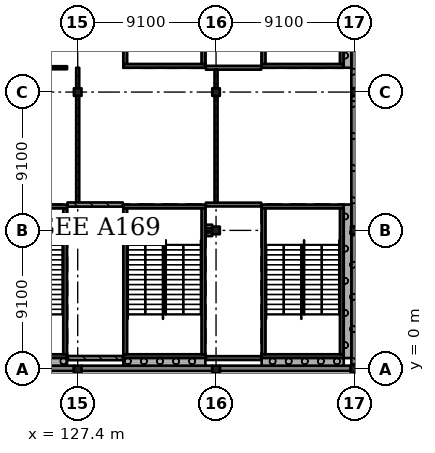
"""IFC4 building model, lengths in metres.
Left out: names, types, materials, properties, quantities, classifications, styles, units other than length and angle.
Written with IfcOpenShell. Run it as: python <this file> out.ifc"""

import sys

from ifc_helpers import new_model, si_unit, direction, frame, frame_2d, origin, origin_2d, place, context, subcontext, project, spatial, rectangle, extrude, element, fill, save


model = new_model("IFC4")
c1 = context("Model", 3, precision=1e-05, world=origin(), true_north=direction((0.0, 1.0)))
c2 = subcontext(c1, "Body", "Model", "MODEL_VIEW")
j1 = project(units=[si_unit("LENGTHUNIT", "METRE"), si_unit("PLANEANGLEUNIT", "RADIAN")], contexts=[c1])
p1 = place(None, origin())
s1 = spatial("IfcSite", under=j1, at=p1, CompositionType="ELEMENT")
p2 = place(p1, origin())
s2 = spatial("IfcBuilding", under=s1, at=p2, CompositionType="ELEMENT")
p3 = place(p2, frame((0.0, 0.0, 24.57)))
s3 = spatial("IfcBuildingStorey", under=s2, at=p3, CompositionType="ELEMENT", Elevation=24.57)
for number, where, z_axis, x_axis in (
    (1, (127.4, -0.05, 0.0), (0.0, 0.0, 1.0), (1.0, 0.0, 0.0)),
    (2, (127.4, 9.1, 0.0), (0.0, 0.0, 1.0), (1.0, 0.0, 0.0)),
    (3, (127.4, 18.2, 0.0), (0.0, 0.0, 1.0), (1.0, 0.0, 0.0)),
    (4, (136.5, -0.05, 0.0), (0.0, 0.0, 1.0), (1.0, 0.0, 0.0)),
    (5, (136.5, 9.1, 0.0), (0.0, 0.0, 1.0), (1.0, 0.0, 0.0)),
    (6, (136.5, 18.2, 0.0), (0.0, 0.0, 1.0), (1.0, 0.0, 0.0)),
    (7, (145.6, 0.0, 0.0), (0.0, 0.0, 1.0), (1.0, 0.0, 0.0)),
    (8, (145.625, 9.1, 0.0), (0.0, 0.0, 1.0), (1.0, 0.0, 0.0)),
    (9, (145.65, 18.2, 0.0), (0.0, 0.0, 1.0), (1.0, 0.0, 0.0)),
):
    element("IfcColumn", number, at=place(p3, frame(where, z_axis=z_axis, x_axis=x_axis)), inside=s3, PredefinedType="COLUMN", context=c2, shape_type="SweptSolid", body=[
        extrude(rectangle(XDim=0.5, YDim=0.5, at=origin_2d()), origin(), (0.0, 0.0, 1.0), 4.55),
    ])
p4 = place(p3, frame((144.9, 0.825, 0.0), z_axis=(0.0, 0.0, 1.0), x_axis=(-1.0, 0.0, 0.0)))
e10 = element("IfcWall", 10, at=p4, inside=s3, PredefinedType="SHEAR", context=c2, shape_type="SweptSolid", body=[
    extrude(rectangle(XDim=5.4, YDim=0.25, at=frame_2d((2.7, 0.0))), origin(), (0.0, 0.0, 1.0), 4.55),
])
p5 = place(p3, frame((144.9, 10.675, 0.0), z_axis=(0.0, 0.0, 1.0), x_axis=(-1.0, 0.0, 0.0)))
e11 = element("IfcWall", 11, at=p5, inside=s3, PredefinedType="SHEAR", context=c2, shape_type="SweptSolid", body=[
    extrude(rectangle(XDim=5.4, YDim=0.25, at=frame_2d((2.7, 0.0))), origin(), (0.0, 0.0, 1.0), 4.55),
])
p6 = place(p5, frame((1.5, 0.0, 0.0)))
e12 = element("IfcOpeningElement", 12, at=p6, cuts=e11, PredefinedType="OPENING", context=c2, shape_type="SweptSolid", body=[
    extrude(rectangle(XDim=2.4, YDim=2.1, at=frame_2d((1.2, 1.05))), frame((0.0, 0.135, 0.0), z_axis=(0.0, -1.0, 0.0), x_axis=(1.0, 0.0, 0.0)), (0.0, 0.0, 1.0), 0.27),
])
for number, where, z_axis, x_axis in (
    (13, (139.625, 10.55, 0.0), (0.0, 0.0, 1.0), (0.0, -1.0, 0.0)),
    (14, (144.775, 10.55, 0.0), (0.0, 0.0, 1.0), (0.0, -1.0, 0.0)),
):
    element("IfcWall", number, at=place(p3, frame(where, z_axis=z_axis, x_axis=x_axis)), inside=s3, PredefinedType="SHEAR", context=c2, shape_type="SweptSolid", body=[
        extrude(rectangle(XDim=9.6, YDim=0.25, at=frame_2d((4.8, 0.0))), origin(), (0.0, 0.0, 1.0), 4.55),
    ])
p7 = place(p3, frame((135.8, 0.825, 0.0), z_axis=(0.0, 0.0, 1.0), x_axis=(-1.0, 0.0, 0.0)))
e15 = element("IfcWall", 15, at=p7, inside=s3, PredefinedType="SHEAR", context=c2, shape_type="SweptSolid", body=[
    extrude(rectangle(XDim=5.4, YDim=0.25, at=frame_2d((2.7, 0.0))), origin(), (0.0, 0.0, 1.0), 4.55),
])
p8 = place(p3, frame((135.8, 10.675, 0.0), z_axis=(0.0, 0.0, 1.0), x_axis=(-1.0, 0.0, 0.0)))
e16 = element("IfcWall", 16, at=p8, inside=s3, PredefinedType="SHEAR", context=c2, shape_type="SweptSolid", body=[
    extrude(rectangle(XDim=5.4, YDim=0.25, at=frame_2d((2.7, 0.0))), origin(), (0.0, 0.0, 1.0), 4.55),
])
p9 = place(p8, frame((1.5, 0.0, 0.0)))
e17 = element("IfcOpeningElement", 17, at=p9, cuts=e16, PredefinedType="OPENING", context=c2, shape_type="SweptSolid", body=[
    extrude(rectangle(XDim=2.4, YDim=2.1, at=frame_2d((1.2, 1.05))), frame((0.0, 0.135, 0.0), z_axis=(0.0, -1.0, 0.0), x_axis=(1.0, 0.0, 0.0)), (0.0, 0.0, 1.0), 0.27),
])
for number, where, z_axis, x_axis in (
    (18, (130.525, 10.55, 0.0), (0.0, 0.0, 1.0), (0.0, -1.0, 0.0)),
    (19, (135.675, 10.55, 0.0), (0.0, 0.0, 1.0), (0.0, -1.0, 0.0)),
):
    element("IfcWall", number, at=place(p3, frame(where, z_axis=z_axis, x_axis=x_axis)), inside=s3, PredefinedType="SHEAR", context=c2, shape_type="SweptSolid", body=[
        extrude(rectangle(XDim=9.6, YDim=0.25, at=frame_2d((4.8, 0.0))), origin(), (0.0, 0.0, 1.0), 4.55),
    ])
p10 = place(p3, frame((126.7, 0.825, 0.0), z_axis=(0.0, 0.0, 1.0), x_axis=(-1.0, 0.0, 0.0)))
e20 = element("IfcWall", 20, at=p10, inside=s3, PredefinedType="SHEAR", context=c2, shape_type="SweptSolid", body=[
    extrude(rectangle(XDim=5.4, YDim=0.25, at=frame_2d((2.7, 0.0))), origin(), (0.0, 0.0, 1.0), 4.55),
])
p11 = place(p3, frame((126.7, 10.675, 0.0), z_axis=(0.0, 0.0, 1.0), x_axis=(-1.0, 0.0, 0.0)))
e21 = element("IfcWall", 21, at=p11, inside=s3, PredefinedType="SHEAR", context=c2, shape_type="SweptSolid", body=[
    extrude(rectangle(XDim=5.4, YDim=0.25, at=frame_2d((2.7, 0.0))), origin(), (0.0, 0.0, 1.0), 4.55),
])
p12 = place(p11, frame((1.5, 0.0, 0.0)))
e22 = element("IfcOpeningElement", 22, at=p12, cuts=e21, PredefinedType="OPENING", context=c2, shape_type="SweptSolid", body=[
    extrude(rectangle(XDim=2.4, YDim=2.1, at=frame_2d((1.2, 1.05))), frame((0.0, 0.135, 0.0), z_axis=(0.0, -1.0, 0.0), x_axis=(1.0, 0.0, 0.0)), (0.0, 0.0, 1.0), 0.27),
])
p13 = place(p3, frame((126.575, 10.55, 0.0), z_axis=(0.0, 0.0, 1.0), x_axis=(0.0, -1.0, 0.0)))
e23 = element("IfcWall", 23, at=p13, inside=s3, PredefinedType="SHEAR", context=c2, shape_type="SweptSolid", body=[
    extrude(rectangle(XDim=9.6, YDim=0.25, at=frame_2d((4.8, 0.0))), origin(), (0.0, 0.0, 1.0), 4.55),
])
p14 = place(p3, frame((144.9, 19.925, 0.0), z_axis=(0.0, 0.0, 1.0), x_axis=(-1.0, 0.0, 0.0)))
e24 = element("IfcWall", 24, at=p14, inside=s3, PredefinedType="SHEAR", context=c2, shape_type="SweptSolid", body=[
    extrude(rectangle(XDim=5.4, YDim=0.25, at=frame_2d((2.7, 0.0))), origin(), (0.0, 0.0, 1.0), 4.55),
])
p15 = place(p14, frame((1.5, 0.0, 0.0)))
e25 = element("IfcOpeningElement", 25, at=p15, cuts=e24, PredefinedType="OPENING", context=c2, shape_type="SweptSolid", body=[
    extrude(rectangle(XDim=2.4, YDim=2.1, at=frame_2d((1.2, 1.05))), frame((0.0, 0.135, 0.0), z_axis=(0.0, -1.0, 0.0), x_axis=(1.0, 0.0, 0.0)), (0.0, 0.0, 1.0), 0.27),
])
for number, where, z_axis, x_axis in (
    (26, (139.625, 29.65, 0.0), (0.0, 0.0, 1.0), (0.0, -1.0, 0.0)),
    (27, (144.775, 29.65, 0.0), (0.0, 0.0, 1.0), (0.0, -1.0, 0.0)),
):
    element("IfcWall", number, at=place(p3, frame(where, z_axis=z_axis, x_axis=x_axis)), inside=s3, PredefinedType="SHEAR", context=c2, shape_type="SweptSolid", body=[
        extrude(rectangle(XDim=9.6, YDim=0.25, at=frame_2d((4.8, 0.0))), origin(), (0.0, 0.0, 1.0), 4.55),
    ])
p16 = place(p3, frame((135.8, 19.925, 0.0), z_axis=(0.0, 0.0, 1.0), x_axis=(-1.0, 0.0, 0.0)))
e28 = element("IfcWall", 28, at=p16, inside=s3, PredefinedType="SHEAR", context=c2, shape_type="SweptSolid", body=[
    extrude(rectangle(XDim=5.4, YDim=0.25, at=frame_2d((2.7, 0.0))), origin(), (0.0, 0.0, 1.0), 4.55),
])
p17 = place(p16, frame((1.5, 0.0, 0.0)))
e29 = element("IfcOpeningElement", 29, at=p17, cuts=e28, PredefinedType="OPENING", context=c2, shape_type="SweptSolid", body=[
    extrude(rectangle(XDim=2.4, YDim=2.1, at=frame_2d((1.2, 1.05))), frame((0.0, 0.135, 0.0), z_axis=(0.0, -1.0, 0.0), x_axis=(1.0, 0.0, 0.0)), (0.0, 0.0, 1.0), 0.27),
])
for number, where, z_axis, x_axis in (
    (30, (130.525, 29.65, 0.0), (0.0, 0.0, 1.0), (0.0, -1.0, 0.0)),
    (31, (135.675, 29.65, 0.0), (0.0, 0.0, 1.0), (0.0, -1.0, 0.0)),
):
    element("IfcWall", number, at=place(p3, frame(where, z_axis=z_axis, x_axis=x_axis)), inside=s3, PredefinedType="SHEAR", context=c2, shape_type="SweptSolid", body=[
        extrude(rectangle(XDim=9.6, YDim=0.25, at=frame_2d((4.8, 0.0))), origin(), (0.0, 0.0, 1.0), 4.55),
    ])
p18 = place(p3, frame((118.55, 0.025, 0.0), z_axis=(0.0, 0.0, 1.0), x_axis=(1.0, 0.0, 0.0)))
e32 = element("IfcWall", 32, at=p18, inside=s3, PredefinedType="SOLIDWALL", context=c2, shape_type="SweptSolid", body=[
    extrude(rectangle(XDim=8.6, YDim=0.35, at=frame_2d((4.3, 0.0))), origin(), (0.0, 0.0, 1.0), 3.6),
])
for number, where, z_axis, x_axis in (
    (33, (127.65, 0.025, 0.0), (0.0, 0.0, 1.0), (1.0, 0.0, 0.0)),
    (34, (136.75, 0.025, 0.0), (0.0, 0.0, 1.0), (1.0, 0.0, 0.0)),
    (35, (145.575, 0.25, 0.0), (0.0, 0.0, 1.0), (0.0, 1.0, 0.0)),
):
    element("IfcWall", number, at=place(p3, frame(where, z_axis=z_axis, x_axis=x_axis)), inside=s3, PredefinedType="SOLIDWALL", context=c2, shape_type="SweptSolid", body=[
        extrude(rectangle(XDim=8.6, YDim=0.35, at=frame_2d((4.3, 0.0))), origin(), (0.0, 0.0, 1.0), 3.6),
    ])
p19 = place(p3, frame((145.575, 9.35, 0.0), z_axis=(0.0, 0.0, 1.0), x_axis=(0.0, 1.0, 0.0)))
e36 = element("IfcWall", 36, at=p19, inside=s3, PredefinedType="SOLIDWALL", context=c2, shape_type="SweptSolid", body=[
    extrude(rectangle(XDim=8.6, YDim=0.35, at=frame_2d((4.3, 0.0))), origin(), (0.0, 0.0, 1.0), 3.6),
])
p20 = place(p3, frame((145.575, 18.45, 0.0), z_axis=(0.0, 0.0, 1.0), x_axis=(0.0, 1.0, 0.0)))
e37 = element("IfcWall", 37, at=p20, inside=s3, PredefinedType="SOLIDWALL", context=c2, shape_type="SweptSolid", body=[
    extrude(rectangle(XDim=8.6, YDim=0.35, at=frame_2d((4.3, 0.0))), origin(), (0.0, 0.0, 1.0), 3.6),
])
p21 = place(p3, frame((139.5, 0.45, 0.0), z_axis=(0.0, 0.0, 1.0), x_axis=(1.0, 0.0, 0.0)))
e38 = element("IfcWall", 38, at=p21, inside=s3, PredefinedType="SOLIDWALL", context=c2, shape_type="SweptSolid", body=[
    extrude(rectangle(XDim=5.4, YDim=0.5, at=frame_2d((2.7, 0.0))), origin(), (0.0, 0.0, 1.0), 4.35),
])
p22 = place(p3, frame((145.15, 0.7, 0.0), z_axis=(0.0, 0.0, 1.0), x_axis=(0.0, 1.0, 0.0)))
e39 = element("IfcWall", 39, at=p22, inside=s3, PredefinedType="SOLIDWALL", context=c2, shape_type="SweptSolid", body=[
    extrude(rectangle(XDim=10.1, YDim=0.5, at=frame_2d((5.05, 0.0))), origin(), (0.0, 0.0, 1.0), 4.55),
])
p23 = place(p3, frame((130.4, 0.45, 0.0), z_axis=(0.0, 0.0, 1.0), x_axis=(1.0, 0.0, 0.0)))
e40 = element("IfcWall", 40, at=p23, inside=s3, PredefinedType="SOLIDWALL", context=c2, shape_type="SweptSolid", body=[
    extrude(rectangle(XDim=5.4, YDim=0.5, at=frame_2d((2.7, 0.0))), origin(), (0.0, 0.0, 1.0), 4.35),
])
p24 = place(p3, frame((121.3, 0.45, 0.0), z_axis=(0.0, 0.0, 1.0), x_axis=(1.0, 0.0, 0.0)))
e41 = element("IfcWall", 41, at=p24, inside=s3, PredefinedType="SOLIDWALL", context=c2, shape_type="SweptSolid", body=[
    extrude(rectangle(XDim=5.4, YDim=0.5, at=frame_2d((2.7, 0.0))), origin(), (0.0, 0.0, 1.0), 4.35),
])
p25 = place(p3, frame((145.15, 19.8, 0.0), z_axis=(0.0, 0.0, 1.0), x_axis=(0.0, 1.0, 0.0)))
e42 = element("IfcWall", 42, at=p25, inside=s3, PredefinedType="SOLIDWALL", context=c2, shape_type="SweptSolid", body=[
    extrude(rectangle(XDim=10.1, YDim=0.5, at=frame_2d((5.05, 0.0))), origin(), (0.0, 0.0, 1.0), 4.55),
])
p26 = place(p3, frame((121.3, 19.8, 0.0), z_axis=(0.0, 0.0, 1.0), x_axis=(1.0, 0.0, 0.0)))
e43 = element("IfcWall", 43, at=p26, inside=s3, PredefinedType="PARTITIONING", context=c2, shape_type="SweptSolid", body=[
    extrude(rectangle(XDim=5.4, YDim=0.2, at=frame_2d((2.7, 0.0))), origin(), (0.0, 0.0, 1.0), 4.35),
])
p27 = place(p26, frame((1.85, 0.0, 0.0)))
e44 = element("IfcOpeningElement", 44, at=p27, cuts=e43, PredefinedType="OPENING", context=c2, shape_type="SweptSolid", body=[
    extrude(rectangle(XDim=1.8, YDim=2.4, at=frame_2d((0.9, 1.2))), frame((0.0, 0.11, 0.0), z_axis=(0.0, -1.0, 0.0), x_axis=(1.0, 0.0, 0.0)), (0.0, 0.0, 1.0), 0.22),
])
for number, where, z_axis, x_axis in (
    (45, (126.73, 8.85, 0.0), (0.0, 0.0, 1.0), (1.0, 0.0, 0.0)),
    (46, (127.15, 9.35, 0.0), (0.0, 0.0, 1.0), (-1.0, 0.0, 0.0)),
):
    element("IfcWall", number, at=place(p3, frame(where, z_axis=z_axis, x_axis=x_axis)), inside=s3, PredefinedType="SOLIDWALL", context=c2, shape_type="SweptSolid", body=[
        extrude(rectangle(XDim=0.42, YDim=0.275, at=frame_2d((0.21, 0.0))), origin(), (0.0, 0.0, 1.0), 4.35),
    ])
p28 = place(p3, frame((126.73, 10.8, 0.0), z_axis=(0.0, 0.0, 1.0), x_axis=(1.0, 0.0, 0.0)))
e47 = element("IfcWall", 47, at=p28, inside=s3, PredefinedType="SOLIDWALL", context=c2, shape_type="SweptSolid", body=[
    extrude(rectangle(XDim=3.64, YDim=0.275, at=frame_2d((1.82, 0.0))), origin(), (0.0, 0.0, 1.0), 4.35),
])
p29 = place(p28, frame((1.59, 0.0, 0.0)))
e48 = element("IfcOpeningElement", 48, at=p29, cuts=e47, PredefinedType="OPENING", context=c2, shape_type="SweptSolid", body=[
    extrude(rectangle(XDim=1.2, YDim=2.4, at=frame_2d((0.6, 1.2))), frame((0.0, 0.147, 0.0), z_axis=(0.0, -1.0, 0.0), x_axis=(1.0, 0.0, 0.0)), (0.0, 0.0, 1.0), 0.295),
])
p30 = place(p3, frame((127.4, 10.938, 0.0), z_axis=(0.0, 0.0, 1.0), x_axis=(0.0, 1.0, 0.0)))
e49 = element("IfcWall", 49, at=p30, inside=s3, PredefinedType="PARTITIONING", context=c2, shape_type="SweptSolid", body=[
    extrude(rectangle(XDim=7.012, YDim=0.2, at=frame_2d((3.506, 0.0))), origin(), (0.0, 0.0, 1.0), 3.6),
])
p31 = place(p30, frame((0.85, 0.0, 0.0)))
e50 = element("IfcOpeningElement", 50, at=p31, cuts=e49, PredefinedType="OPENING", context=c2, shape_type="SweptSolid", body=[
    extrude(rectangle(XDim=1.8, YDim=2.4, at=frame_2d((0.9, 1.2))), frame((0.0, 0.11, 0.0), z_axis=(0.0, -1.0, 0.0), x_axis=(1.0, 0.0, 0.0)), (0.0, 0.0, 1.0), 0.22),
])
p32 = place(p30, frame((4.35, 0.0, 0.0)))
e51 = element("IfcOpeningElement", 51, at=p32, cuts=e49, PredefinedType="OPENING", context=c2, shape_type="SweptSolid", body=[
    extrude(rectangle(XDim=1.8, YDim=2.4, at=frame_2d((0.9, 1.2))), frame((0.0, 0.11, 0.0), z_axis=(0.0, -1.0, 0.0), x_axis=(1.0, 0.0, 0.0)), (0.0, 0.0, 1.0), 0.22),
])
p33 = place(p3, frame((127.4, 18.45, 0.0), z_axis=(0.0, 0.0, 1.0), x_axis=(0.0, 1.0, 0.0)))
e52 = element("IfcWall", 52, at=p33, inside=s3, PredefinedType="PARTITIONING", context=c2, shape_type="SweptSolid", body=[
    extrude(rectangle(XDim=1.35, YDim=0.2, at=frame_2d((0.675, 0.0))), origin(), (0.0, 0.0, 1.0), 3.6),
])
p34 = place(p3, frame((130.37, 0.7, 0.0), z_axis=(0.0, 0.0, 1.0), x_axis=(-1.0, 0.0, 0.0)))
e53 = element("IfcWall", 53, at=p34, inside=s3, PredefinedType="SOLIDWALL", context=c2, shape_type="SweptSolid", body=[
    extrude(rectangle(XDim=3.64, YDim=0.275, at=frame_2d((1.82, 0.0))), origin(), (0.0, 0.0, 1.0), 4.35),
])
p35 = place(p3, frame((135.83, 8.85, 0.0), z_axis=(0.0, 0.0, 1.0), x_axis=(1.0, 0.0, 0.0)))
e54 = element("IfcWall", 54, at=p35, inside=s3, PredefinedType="SOLIDWALL", context=c2, shape_type="SweptSolid", body=[
    extrude(rectangle(XDim=0.42, YDim=0.25, at=frame_2d((0.21, 0.0))), origin(), (0.0, 0.0, 1.0), 4.35),
])
p36 = place(p3, frame((135.83, 19.8, 0.0), z_axis=(0.0, 0.0, 1.0), x_axis=(1.0, 0.0, 0.0)))
e55 = element("IfcWall", 55, at=p36, inside=s3, PredefinedType="SOLIDWALL", context=c2, shape_type="SweptSolid", body=[
    extrude(rectangle(XDim=3.64, YDim=0.25, at=frame_2d((1.82, 0.0))), origin(), (0.0, 0.0, 1.0), 4.35),
])
p37 = place(p36, frame((1.62, 0.0, 0.0)))
e56 = element("IfcOpeningElement", 56, at=p37, cuts=e55, PredefinedType="OPENING", context=c2, shape_type="SweptSolid", body=[
    extrude(rectangle(XDim=1.0, YDim=2.1, at=frame_2d((0.5, 1.05))), frame((0.0, 0.135, 0.0), z_axis=(0.0, -1.0, 0.0), x_axis=(1.0, 0.0, 0.0)), (0.0, 0.0, 1.0), 0.27),
])
p38 = place(p3, frame((136.25, 9.35, 0.0), z_axis=(0.0, 0.0, 1.0), x_axis=(-1.0, 0.0, 0.0)))
e57 = element("IfcWall", 57, at=p38, inside=s3, PredefinedType="SOLIDWALL", context=c2, shape_type="SweptSolid", body=[
    extrude(rectangle(XDim=0.42, YDim=0.25, at=frame_2d((0.21, 0.0))), origin(), (0.0, 0.0, 1.0), 4.35),
])
p39 = place(p3, frame((135.83, 10.8, 0.0), z_axis=(0.0, 0.0, 1.0), x_axis=(1.0, 0.0, 0.0)))
e58 = element("IfcWall", 58, at=p39, inside=s3, PredefinedType="SOLIDWALL", context=c2, shape_type="SweptSolid", body=[
    extrude(rectangle(XDim=3.64, YDim=0.25, at=frame_2d((1.82, 0.0))), origin(), (0.0, 0.0, 1.0), 4.35),
])
p40 = place(p39, frame((1.69, 0.0, 0.0)))
e59 = element("IfcOpeningElement", 59, at=p40, cuts=e58, PredefinedType="OPENING", context=c2, shape_type="SweptSolid", body=[
    extrude(rectangle(XDim=1.0, YDim=2.1, at=frame_2d((0.5, 1.05))), frame((0.0, 0.135, 0.0), z_axis=(0.0, -1.0, 0.0), x_axis=(1.0, 0.0, 0.0)), (0.0, 0.0, 1.0), 0.27),
])
p41 = place(p3, frame((136.5, 10.925, 0.0), z_axis=(0.0, 0.0, 1.0), x_axis=(0.0, 1.0, 0.0)))
e60 = element("IfcWall", 60, at=p41, inside=s3, PredefinedType="PARTITIONING", context=c2, shape_type="SweptSolid", body=[
    extrude(rectangle(XDim=7.025, YDim=0.2, at=frame_2d((3.512, 0.0))), origin(), (0.0, 0.0, 1.0), 3.6),
])
p42 = place(p41, frame((0.85, 0.0, 0.0)))
e61 = element("IfcOpeningElement", 61, at=p42, cuts=e60, PredefinedType="OPENING", context=c2, shape_type="SweptSolid", body=[
    extrude(rectangle(XDim=1.8, YDim=2.4, at=frame_2d((0.9, 1.2))), frame((0.0, 0.11, 0.0), z_axis=(0.0, -1.0, 0.0), x_axis=(1.0, 0.0, 0.0)), (0.0, 0.0, 1.0), 0.22),
])
p43 = place(p41, frame((4.35, 0.0, 0.0)))
e62 = element("IfcOpeningElement", 62, at=p43, cuts=e60, PredefinedType="OPENING", context=c2, shape_type="SweptSolid", body=[
    extrude(rectangle(XDim=1.8, YDim=2.4, at=frame_2d((0.9, 1.2))), frame((0.0, 0.11, 0.0), z_axis=(0.0, -1.0, 0.0), x_axis=(1.0, 0.0, 0.0)), (0.0, 0.0, 1.0), 0.22),
])
p44 = place(p3, frame((136.5, 18.45, 0.0), z_axis=(0.0, 0.0, 1.0), x_axis=(0.0, 1.0, 0.0)))
e63 = element("IfcWall", 63, at=p44, inside=s3, PredefinedType="PARTITIONING", context=c2, shape_type="SweptSolid", body=[
    extrude(rectangle(XDim=1.225, YDim=0.2, at=frame_2d((0.613, 0.0))), origin(), (0.0, 0.0, 1.0), 3.6),
])
p45 = place(p3, frame((139.47, 0.7, 0.0), z_axis=(0.0, 0.0, 1.0), x_axis=(-1.0, 0.0, 0.0)))
e64 = element("IfcWall", 64, at=p45, inside=s3, PredefinedType="SOLIDWALL", context=c2, shape_type="SweptSolid", body=[
    extrude(rectangle(XDim=3.64, YDim=0.25, at=frame_2d((1.82, 0.0))), origin(), (0.0, 0.0, 1.0), 4.35),
])
p46 = place(p37, origin())
e65 = element("IfcDoor", 65, at=p46, inside=s3, OperationType="SINGLE_SWING_RIGHT", PredefinedType="DOOR", context=c2, shape_type="SweptSolid", body=[
    extrude(rectangle(XDim=1.0, YDim=2.1, at=frame_2d((0.5, 1.05))), frame((0.0, 0.025, 0.0), z_axis=(0.0, -1.0, 0.0), x_axis=(1.0, 0.0, 0.0)), (0.0, 0.0, 1.0), 0.05),
])
fill(e56, e65)
p47 = place(p40, origin())
e66 = element("IfcDoor", 66, at=p47, inside=s3, OperationType="SINGLE_SWING_RIGHT", PredefinedType="DOOR", context=c2, shape_type="SweptSolid", body=[
    extrude(rectangle(XDim=1.0, YDim=2.1, at=frame_2d((0.5, 1.05))), frame((0.0, 0.025, 0.0), z_axis=(0.0, -1.0, 0.0), x_axis=(1.0, 0.0, 0.0)), (0.0, 0.0, 1.0), 0.05),
])
fill(e59, e66)
p48 = place(p29, origin())
e67 = element("IfcDoor", 67, at=p48, inside=s3, OperationType="SINGLE_SWING_RIGHT", PredefinedType="DOOR", context=c2, shape_type="SweptSolid", body=[
    extrude(rectangle(XDim=1.2, YDim=2.4, at=frame_2d((0.6, 1.2))), frame((0.0, 0.025, 0.0), z_axis=(0.0, -1.0, 0.0), x_axis=(1.0, 0.0, 0.0)), (0.0, 0.0, 1.0), 0.05),
])
fill(e48, e67)
p49 = place(p42, origin())
e68 = element("IfcDoor", 68, at=p49, inside=s3, OperationType="DOUBLE_DOOR_SINGLE_SWING", PredefinedType="DOOR", context=c2, shape_type="SweptSolid", body=[
    extrude(rectangle(XDim=1.8, YDim=2.4, at=frame_2d((0.9, 1.2))), frame((0.0, 0.025, 0.0), z_axis=(0.0, -1.0, 0.0), x_axis=(1.0, 0.0, 0.0)), (0.0, 0.0, 1.0), 0.05),
])
fill(e61, e68)
p50 = place(p43, origin())
e69 = element("IfcDoor", 69, at=p50, inside=s3, OperationType="DOUBLE_DOOR_SINGLE_SWING", PredefinedType="DOOR", context=c2, shape_type="SweptSolid", body=[
    extrude(rectangle(XDim=1.8, YDim=2.4, at=frame_2d((0.9, 1.2))), frame((0.0, 0.025, 0.0), z_axis=(0.0, -1.0, 0.0), x_axis=(1.0, 0.0, 0.0)), (0.0, 0.0, 1.0), 0.05),
])
fill(e62, e69)
p51 = place(p31, origin())
e70 = element("IfcDoor", 70, at=p51, inside=s3, OperationType="DOUBLE_DOOR_SINGLE_SWING", PredefinedType="DOOR", context=c2, shape_type="SweptSolid", body=[
    extrude(rectangle(XDim=1.8, YDim=2.4, at=frame_2d((0.9, 1.2))), frame((0.0, 0.025, 0.0), z_axis=(0.0, -1.0, 0.0), x_axis=(1.0, 0.0, 0.0)), (0.0, 0.0, 1.0), 0.05),
])
fill(e50, e70)
p52 = place(p32, origin())
e71 = element("IfcDoor", 71, at=p52, inside=s3, OperationType="DOUBLE_DOOR_SINGLE_SWING", PredefinedType="DOOR", context=c2, shape_type="SweptSolid", body=[
    extrude(rectangle(XDim=1.8, YDim=2.4, at=frame_2d((0.9, 1.2))), frame((0.0, 0.025, 0.0), z_axis=(0.0, -1.0, 0.0), x_axis=(1.0, 0.0, 0.0)), (0.0, 0.0, 1.0), 0.05),
])
fill(e51, e71)
p53 = place(p6, origin())
e72 = element("IfcDoor", 72, at=p53, inside=s3, OperationType="DOUBLE_DOOR_SINGLE_SWING", PredefinedType="DOOR", context=c2, shape_type="SweptSolid", body=[
    extrude(rectangle(XDim=2.4, YDim=2.1, at=frame_2d((1.2, 1.05))), frame((0.0, 0.025, 0.0), z_axis=(0.0, -1.0, 0.0), x_axis=(1.0, 0.0, 0.0)), (0.0, 0.0, 1.0), 0.05),
])
fill(e12, e72)
p54 = place(p9, origin())
e73 = element("IfcDoor", 73, at=p54, inside=s3, OperationType="DOUBLE_DOOR_SINGLE_SWING", PredefinedType="DOOR", context=c2, shape_type="SweptSolid", body=[
    extrude(rectangle(XDim=2.4, YDim=2.1, at=frame_2d((1.2, 1.05))), frame((0.0, 0.025, 0.0), z_axis=(0.0, -1.0, 0.0), x_axis=(1.0, 0.0, 0.0)), (0.0, 0.0, 1.0), 0.05),
])
fill(e17, e73)
p55 = place(p15, origin())
e74 = element("IfcDoor", 74, at=p55, inside=s3, OperationType="DOUBLE_DOOR_SINGLE_SWING", PredefinedType="DOOR", context=c2, shape_type="SweptSolid", body=[
    extrude(rectangle(XDim=2.4, YDim=2.1, at=frame_2d((1.2, 1.05))), frame((0.0, 0.025, 0.0), z_axis=(0.0, -1.0, 0.0), x_axis=(1.0, 0.0, 0.0)), (0.0, 0.0, 1.0), 0.05),
])
fill(e25, e74)
p56 = place(p17, origin())
e75 = element("IfcDoor", 75, at=p56, inside=s3, OperationType="DOUBLE_DOOR_SINGLE_SWING", PredefinedType="DOOR", context=c2, shape_type="SweptSolid", body=[
    extrude(rectangle(XDim=2.4, YDim=2.1, at=frame_2d((1.2, 1.05))), frame((0.0, 0.025, 0.0), z_axis=(0.0, -1.0, 0.0), x_axis=(1.0, 0.0, 0.0)), (0.0, 0.0, 1.0), 0.05),
])
fill(e29, e75)
save(model, sys.argv[1])
